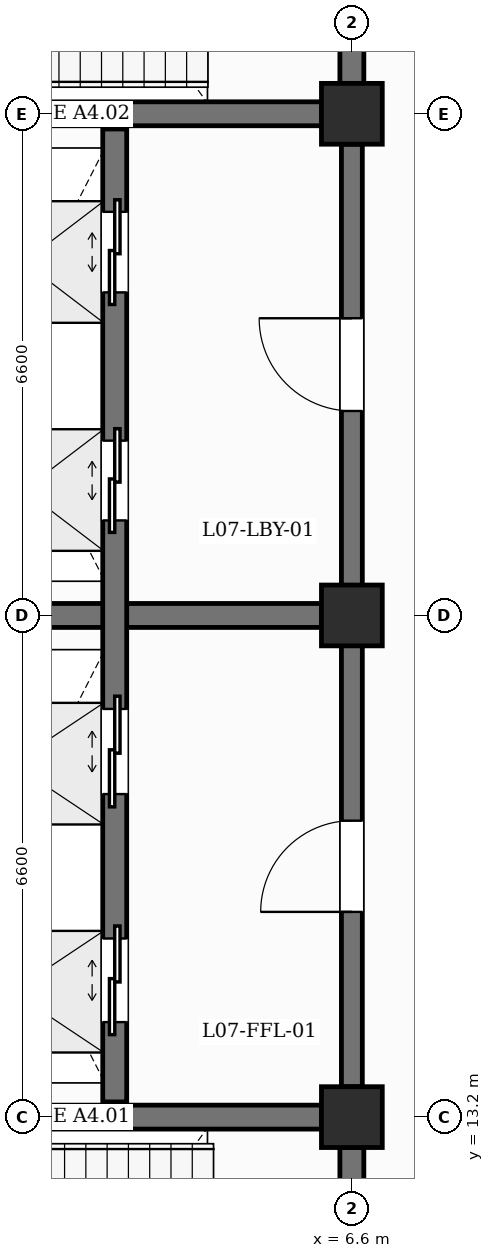
"""IFC4 building model, lengths in metres.
Left out: names, types, materials, properties, quantities, classifications, styles, units other than length and angle.
Written with IfcOpenShell. Run it as: python <this file> out.ifc"""

import sys

from ifc_helpers import new_model, si_unit, direction, frame, frame_2d, origin, origin_2d, place, context, subcontext, project, spatial, rectangle, extrude, element, fill, save


model = new_model("IFC4")
c1 = context("Model", 3, precision=1e-05, world=origin(), true_north=direction((0.0, 1.0)))
c2 = subcontext(c1, "Body", "Model", "MODEL_VIEW")
j1 = project(units=[si_unit("LENGTHUNIT", "METRE"), si_unit("PLANEANGLEUNIT", "RADIAN")], contexts=[c1])
p1 = place(None, origin())
s1 = spatial("IfcSite", under=j1, at=p1, CompositionType="ELEMENT")
p2 = place(p1, origin())
s2 = spatial("IfcBuilding", under=s1, at=p2, CompositionType="ELEMENT")
p3 = place(p2, frame((0.0, 0.0, 31.2)))
s3 = spatial("IfcBuildingStorey", under=s2, at=p3, CompositionType="ELEMENT", Elevation=31.2)
for number, where, z_axis, x_axis in (
    (1, (6.6, 13.2, 0.0), (0.0, 0.0, 1.0), (1.0, 0.0, 0.0)),
    (2, (6.6, 19.8, 0.0), (0.0, 0.0, 1.0), (1.0, 0.0, 0.0)),
    (3, (6.6, 26.4, 0.0), (0.0, 0.0, 1.0), (1.0, 0.0, 0.0)),
):
    element("IfcColumn", number, at=place(p3, frame(where, z_axis=z_axis, x_axis=x_axis)), inside=s3, PredefinedType="COLUMN", context=c2, shape_type="SweptSolid", body=[
        extrude(rectangle(XDim=0.8, YDim=0.8, at=origin_2d()), origin(), (0.0, 0.0, 1.0), 4.2),
    ])
p4 = place(p3, frame((0.4, 13.2, 0.0), z_axis=(0.0, 0.0, 1.0), x_axis=(1.0, 0.0, 0.0)))
e4 = element("IfcWall", 4, at=p4, inside=s3, PredefinedType="SHEAR", context=c2, shape_type="SweptSolid", body=[
    extrude(rectangle(XDim=5.8, YDim=0.315, at=frame_2d((2.9, 0.0))), origin(), (0.0, 0.0, 1.0), 3.18),
])
p5 = place(p3, frame((6.6, 7.0, 0.0), z_axis=(0.0, 0.0, 1.0), x_axis=(0.0, 1.0, 0.0)))
e5 = element("IfcWall", 5, at=p5, inside=s3, PredefinedType="SHEAR", context=c2, shape_type="SweptSolid", body=[
    extrude(rectangle(XDim=5.8, YDim=0.315, at=frame_2d((2.9, 0.0))), origin(), (0.0, 0.0, 1.0), 3.18),
])
p6 = place(p5, frame((2.35, 0.0, 0.0)))
e6 = element("IfcOpeningElement", 6, at=p6, cuts=e5, PredefinedType="OPENING", context=c2, shape_type="SweptSolid", body=[
    extrude(rectangle(XDim=1.1, YDim=2.15, at=frame_2d((0.55, 1.075))), frame((0.0, 0.167, 0.0), z_axis=(0.0, -1.0, 0.0), x_axis=(1.0, 0.0, 0.0)), (0.0, 0.0, 1.0), 0.335),
])
p7 = place(p3, frame((0.4, 26.4, 0.0), z_axis=(0.0, 0.0, 1.0), x_axis=(1.0, 0.0, 0.0)))
e7 = element("IfcWall", 7, at=p7, inside=s3, PredefinedType="SHEAR", context=c2, shape_type="SweptSolid", body=[
    extrude(rectangle(XDim=5.8, YDim=0.315, at=frame_2d((2.9, 0.0))), origin(), (0.0, 0.0, 1.0), 3.18),
])
p8 = place(p3, frame((6.6, 26.8, 0.0), z_axis=(0.0, 0.0, 1.0), x_axis=(0.0, 1.0, 0.0)))
e8 = element("IfcWall", 8, at=p8, inside=s3, PredefinedType="SHEAR", context=c2, shape_type="SweptSolid", body=[
    extrude(rectangle(XDim=5.8, YDim=0.315, at=frame_2d((2.9, 0.0))), origin(), (0.0, 0.0, 1.0), 3.18),
])
p9 = place(p8, frame((2.35, 0.0, 0.0)))
e9 = element("IfcOpeningElement", 9, at=p9, cuts=e8, PredefinedType="OPENING", context=c2, shape_type="SweptSolid", body=[
    extrude(rectangle(XDim=1.1, YDim=2.15, at=frame_2d((0.55, 1.075))), frame((0.0, 0.167, 0.0), z_axis=(0.0, -1.0, 0.0), x_axis=(1.0, 0.0, 0.0)), (0.0, 0.0, 1.0), 0.335),
])
p10 = place(p3, frame((0.4, 19.8, 0.0), z_axis=(0.0, 0.0, 1.0), x_axis=(1.0, 0.0, 0.0)))
e10 = element("IfcWall", 10, at=p10, inside=s3, PredefinedType="SHEAR", context=c2, shape_type="SweptSolid", body=[
    extrude(rectangle(XDim=5.8, YDim=0.315, at=frame_2d((2.9, 0.0))), origin(), (0.0, 0.0, 1.0), 3.18),
])
p11 = place(p3, frame((6.6, 13.6, 0.0), z_axis=(0.0, 0.0, 1.0), x_axis=(0.0, 1.0, 0.0)))
e11 = element("IfcWall", 11, at=p11, inside=s3, PredefinedType="SHEAR", context=c2, shape_type="SweptSolid", body=[
    extrude(rectangle(XDim=5.8, YDim=0.275, at=frame_2d((2.9, 0.0))), origin(), (0.0, 0.0, 1.0), 3.18),
])
p12 = place(p11, frame((2.3, 0.0, 0.0)))
e12 = element("IfcOpeningElement", 12, at=p12, cuts=e11, PredefinedType="OPENING", context=c2, shape_type="SweptSolid", body=[
    extrude(rectangle(XDim=1.2, YDim=2.25, at=frame_2d((0.6, 1.125))), frame((0.0, 0.147, 0.0), z_axis=(0.0, -1.0, 0.0), x_axis=(1.0, 0.0, 0.0)), (0.0, 0.0, 1.0), 0.295),
])
p13 = place(p3, frame((6.6, 20.2, 0.0), z_axis=(0.0, 0.0, 1.0), x_axis=(0.0, 1.0, 0.0)))
e13 = element("IfcWall", 13, at=p13, inside=s3, PredefinedType="SHEAR", context=c2, shape_type="SweptSolid", body=[
    extrude(rectangle(XDim=5.8, YDim=0.275, at=frame_2d((2.9, 0.0))), origin(), (0.0, 0.0, 1.0), 3.18),
])
p14 = place(p13, frame((2.29, 0.0, 0.0)))
e14 = element("IfcOpeningElement", 14, at=p14, cuts=e13, PredefinedType="OPENING", context=c2, shape_type="SweptSolid", body=[
    extrude(rectangle(XDim=1.22, YDim=2.15, at=frame_2d((0.61, 1.075))), frame((0.0, 0.147, 0.0), z_axis=(0.0, -1.0, 0.0), x_axis=(1.0, 0.0, 0.0)), (0.0, 0.0, 1.0), 0.295),
])
p15 = place(p3, frame((3.48, 13.4, 0.0), z_axis=(0.0, 0.0, 1.0), x_axis=(0.0, 1.0, 0.0)))
e15 = element("IfcWall", 15, at=p15, inside=s3, PredefinedType="SHEAR", context=c2, shape_type="SweptSolid", body=[
    extrude(rectangle(XDim=6.2, YDim=0.315, at=frame_2d((3.1, 0.0))), origin(), (0.0, 0.0, 1.0), 3.88),
])
p16 = place(p15, frame((1.05, 0.0, 0.0)))
e16 = element("IfcOpeningElement", 16, at=p16, cuts=e15, PredefinedType="OPENING", context=c2, shape_type="SweptSolid", body=[
    extrude(rectangle(XDim=1.1, YDim=2.15, at=frame_2d((0.55, 1.075))), frame((0.0, 0.167, 0.0), z_axis=(0.0, -1.0, 0.0), x_axis=(1.0, 0.0, 0.0)), (0.0, 0.0, 1.0), 0.335),
])
p17 = place(p15, frame((4.05, 0.0, 0.0)))
e17 = element("IfcOpeningElement", 17, at=p17, cuts=e15, PredefinedType="OPENING", context=c2, shape_type="SweptSolid", body=[
    extrude(rectangle(XDim=1.12, YDim=2.15, at=frame_2d((0.56, 1.075))), frame((0.0, 0.167, 0.0), z_axis=(0.0, -1.0, 0.0), x_axis=(1.0, 0.0, 0.0)), (0.0, 0.0, 1.0), 0.335),
])
p18 = place(p3, frame((3.48, 20.0, 0.0), z_axis=(0.0, 0.0, 1.0), x_axis=(0.0, 1.0, 0.0)))
e18 = element("IfcWall", 18, at=p18, inside=s3, PredefinedType="SHEAR", context=c2, shape_type="SweptSolid", body=[
    extrude(rectangle(XDim=6.2, YDim=0.315, at=frame_2d((3.1, 0.0))), origin(), (0.0, 0.0, 1.0), 3.88),
])
p19 = place(p18, frame((1.05, 0.0, 0.0)))
e19 = element("IfcOpeningElement", 19, at=p19, cuts=e18, PredefinedType="OPENING", context=c2, shape_type="SweptSolid", body=[
    extrude(rectangle(XDim=1.05, YDim=2.15, at=frame_2d((0.525, 1.075))), frame((0.0, 0.167, 0.0), z_axis=(0.0, -1.0, 0.0), x_axis=(1.0, 0.0, 0.0)), (0.0, 0.0, 1.0), 0.335),
])
p20 = place(p18, frame((4.05, 0.0, 0.0)))
e20 = element("IfcOpeningElement", 20, at=p20, cuts=e18, PredefinedType="OPENING", context=c2, shape_type="SweptSolid", body=[
    extrude(rectangle(XDim=1.06, YDim=2.15, at=frame_2d((0.53, 1.075))), frame((0.0, 0.167, 0.0), z_axis=(0.0, -1.0, 0.0), x_axis=(1.0, 0.0, 0.0)), (0.0, 0.0, 1.0), 0.335),
])
p21 = place(p16, origin())
e21 = element("IfcDoor", 21, at=p21, inside=s3, OperationType="DOUBLE_DOOR_SLIDING", PredefinedType="USERDEFINED", context=c2, shape_type="SweptSolid", body=[
    extrude(rectangle(XDim=1.1, YDim=2.15, at=frame_2d((0.55, 1.075))), frame((0.0, 0.025, 0.0), z_axis=(0.0, -1.0, 0.0), x_axis=(1.0, 0.0, 0.0)), (0.0, 0.0, 1.0), 0.05),
])
fill(e16, e21)
p22 = place(p17, origin())
e22 = element("IfcDoor", 22, at=p22, inside=s3, OperationType="DOUBLE_DOOR_SLIDING", PredefinedType="USERDEFINED", context=c2, shape_type="SweptSolid", body=[
    extrude(rectangle(XDim=1.12, YDim=2.15, at=frame_2d((0.56, 1.075))), frame((0.0, 0.025, 0.0), z_axis=(0.0, -1.0, 0.0), x_axis=(1.0, 0.0, 0.0)), (0.0, 0.0, 1.0), 0.05),
])
fill(e17, e22)
p23 = place(p19, origin())
e23 = element("IfcDoor", 23, at=p23, inside=s3, OperationType="DOUBLE_DOOR_SLIDING", PredefinedType="USERDEFINED", context=c2, shape_type="SweptSolid", body=[
    extrude(rectangle(XDim=1.05, YDim=2.15, at=frame_2d((0.525, 1.075))), frame((0.0, 0.025, 0.0), z_axis=(0.0, -1.0, 0.0), x_axis=(1.0, 0.0, 0.0)), (0.0, 0.0, 1.0), 0.05),
])
fill(e19, e23)
p24 = place(p20, origin())
e24 = element("IfcDoor", 24, at=p24, inside=s3, OperationType="DOUBLE_DOOR_SLIDING", PredefinedType="USERDEFINED", context=c2, shape_type="SweptSolid", body=[
    extrude(rectangle(XDim=1.06, YDim=2.15, at=frame_2d((0.53, 1.075))), frame((0.0, 0.025, 0.0), z_axis=(0.0, -1.0, 0.0), x_axis=(1.0, 0.0, 0.0)), (0.0, 0.0, 1.0), 0.05),
])
fill(e20, e24)
p25 = place(p12, origin())
e25 = element("IfcDoor", 25, at=p25, inside=s3, OperationType="SINGLE_SWING_LEFT", PredefinedType="DOOR", context=c2, shape_type="SweptSolid", body=[
    extrude(rectangle(XDim=1.2, YDim=2.25, at=frame_2d((0.6, 1.125))), frame((0.0, 0.025, 0.0), z_axis=(0.0, -1.0, 0.0), x_axis=(1.0, 0.0, 0.0)), (0.0, 0.0, 1.0), 0.05),
])
fill(e12, e25)
p26 = place(p14, origin())
e26 = element("IfcDoor", 26, at=p26, inside=s3, OperationType="SINGLE_SWING_RIGHT", PredefinedType="DOOR", context=c2, shape_type="SweptSolid", body=[
    extrude(rectangle(XDim=1.22, YDim=2.15, at=frame_2d((0.61, 1.075))), frame((0.0, 0.025, 0.0), z_axis=(0.0, -1.0, 0.0), x_axis=(1.0, 0.0, 0.0)), (0.0, 0.0, 1.0), 0.05),
])
fill(e14, e26)
save(model, sys.argv[1])
